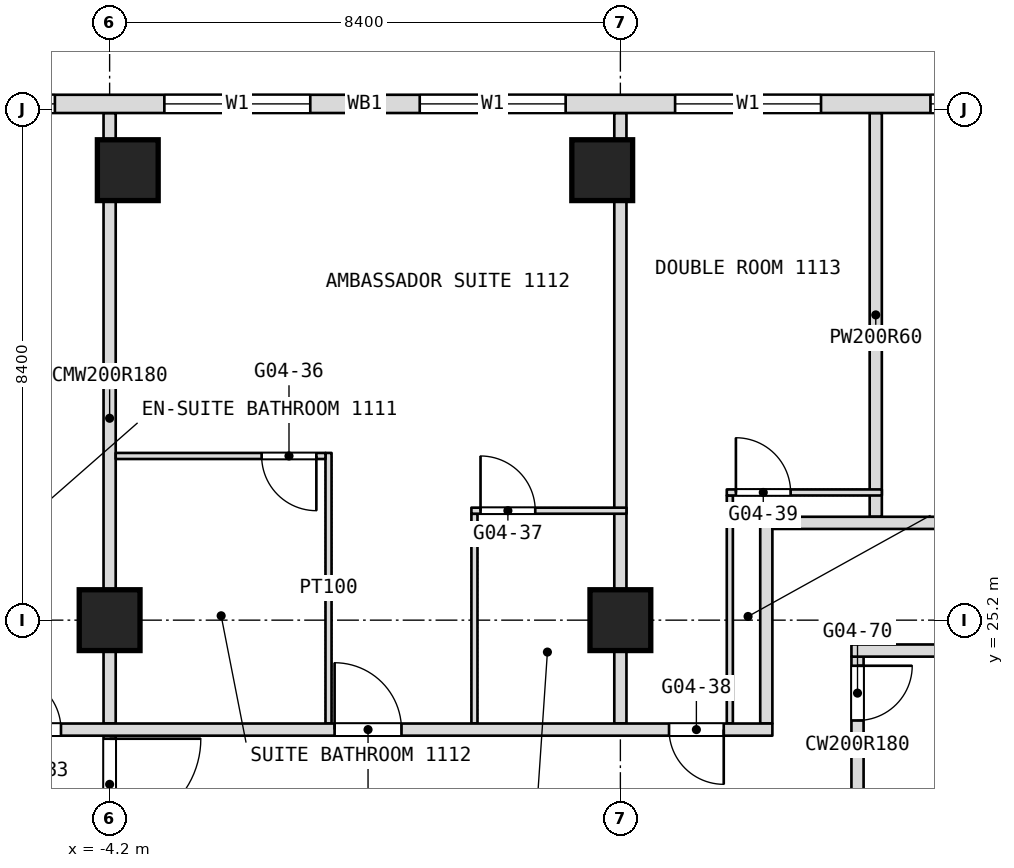
"""IFC4 building model, lengths in metres.
Left out: names, types, materials, properties, quantities, classifications, styles, units other than length and angle.
Written with IfcOpenShell. Run it as: python <this file> out.ifc"""

import sys

from ifc_helpers import new_model, si_unit, direction, frame, frame_2d, origin, origin_2d, place, context, subcontext, project, spatial, rectangle, extrude, element, fill, save


model = new_model("IFC4")
c1 = context("Model", 3, precision=1e-05, world=origin(), true_north=direction((0.0, 1.0)))
c2 = subcontext(c1, "Body", "Model", "MODEL_VIEW")
j1 = project(units=[si_unit("LENGTHUNIT", "METRE"), si_unit("PLANEANGLEUNIT", "RADIAN")], contexts=[c1])
p1 = place(None, origin())
s1 = spatial("IfcSite", under=j1, at=p1, CompositionType="ELEMENT")
p2 = place(p1, origin())
s2 = spatial("IfcBuilding", under=s1, at=p2, CompositionType="ELEMENT")
p3 = place(p2, frame((0.0, 0.0, 54.5)))
s3 = spatial("IfcBuildingStorey", under=s2, at=p3, CompositionType="ELEMENT", Elevation=54.5)
for number, where, z_axis, x_axis in (
    (1, (-4.2, 25.2, 0.0), (0.0, 0.0, 1.0), (1.0, 0.0, 0.0)),
    (2, (4.2, 25.2, 0.0), (0.0, 0.0, 1.0), (1.0, 0.0, 0.0)),
    (3, (-3.901, 32.6, 0.0), (0.0, 0.0, 1.0), (1.0, 0.0, 0.0)),
    (4, (3.901, 32.6, 0.0), (0.0, 0.0, 1.0), (1.0, 0.0, 0.0)),
):
    element("IfcColumn", number, at=place(p3, frame(where, z_axis=z_axis, x_axis=x_axis)), inside=s3, PredefinedType="COLUMN", context=c2, shape_type="SweptSolid", body=[
        extrude(rectangle(XDim=1.0, YDim=1.0, at=origin_2d()), origin(), (0.0, 0.0, 1.0), 3.6),
    ])
p4 = place(p3, frame((8.4, 26.9, 0.0), z_axis=(0.0, 0.0, 1.0), x_axis=(0.0, 1.0, 0.0)))
e5 = element("IfcWall", 5, at=p4, inside=s3, PredefinedType="PARTITIONING", context=c2, shape_type="SweptSolid", body=[
    extrude(rectangle(XDim=6.64, YDim=0.2, at=frame_2d((3.32, 0.0))), origin(), (0.0, 0.0, 1.0), 3.34),
])
p5 = place(p3, frame((8.1, 21.7, 0.0), z_axis=(0.0, 0.0, 1.0), x_axis=(0.0, 1.0, 0.0)))
e6 = element("IfcWall", 6, at=p5, inside=s3, PredefinedType="PARTITIONING", context=c2, shape_type="SweptSolid", body=[
    extrude(rectangle(XDim=2.9, YDim=0.2, at=frame_2d((1.45, 0.0))), origin(), (0.0, 0.0, 1.0), 3.34),
])
p6 = place(p5, frame((1.85, 0.0, 0.0)))
e7 = element("IfcOpeningElement", 7, at=p6, cuts=e6, PredefinedType="OPENING", context=c2, shape_type="SweptSolid", body=[
    extrude(rectangle(XDim=0.9, YDim=2.1, at=frame_2d((0.45, 1.05))), frame((0.0, 0.1, 0.0), z_axis=(0.0, -1.0, 0.0), x_axis=(1.0, 0.0, 0.0)), (0.0, 0.0, 1.0), 0.2),
])
p7 = place(p3, frame((6.6, 23.5, 0.0), z_axis=(0.0, 0.0, 1.0), x_axis=(0.0, 1.0, 0.0)))
e8 = element("IfcWall", 8, at=p7, inside=s3, PredefinedType="PARTITIONING", context=c2, shape_type="SweptSolid", body=[
    extrude(rectangle(XDim=3.4, YDim=0.2, at=frame_2d((1.7, 0.0))), origin(), (0.0, 0.0, 1.0), 3.34),
])
p8 = place(p3, frame((6.0, 23.5, 0.0), z_axis=(0.0, 0.0, 1.0), x_axis=(0.0, 1.0, 0.0)))
e9 = element("IfcWall", 9, at=p8, inside=s3, PredefinedType="PARTITIONING", context=c2, shape_type="SweptSolid", body=[
    extrude(rectangle(XDim=3.75, YDim=0.1, at=frame_2d((1.875, 0.0))), origin(), (0.0, 0.0, 1.0), 3.34),
])
p9 = place(p3, frame((4.2, 23.5, 0.0), z_axis=(0.0, 0.0, 1.0), x_axis=(0.0, 1.0, 0.0)))
e10 = element("IfcWall", 10, at=p9, inside=s3, PredefinedType="PARTITIONING", context=c2, shape_type="SweptSolid", body=[
    extrude(rectangle(XDim=10.04, YDim=0.2, at=frame_2d((5.02, 0.0))), origin(), (0.0, 0.0, 1.0), 3.34),
])
p10 = place(p3, frame((1.8, 23.5, 0.0), z_axis=(0.0, 0.0, 1.0), x_axis=(0.0, 1.0, 0.0)))
e11 = element("IfcWall", 11, at=p10, inside=s3, PredefinedType="PARTITIONING", context=c2, shape_type="SweptSolid", body=[
    extrude(rectangle(XDim=3.45, YDim=0.1, at=frame_2d((1.725, 0.0))), origin(), (0.0, 0.0, 1.0), 3.34),
])
p11 = place(p3, frame((-0.6, 23.5, 0.0), z_axis=(0.0, 0.0, 1.0), x_axis=(0.0, 1.0, 0.0)))
e12 = element("IfcWall", 12, at=p11, inside=s3, PredefinedType="PARTITIONING", context=c2, shape_type="SweptSolid", body=[
    extrude(rectangle(XDim=4.45, YDim=0.1, at=frame_2d((2.225, 0.0))), origin(), (0.0, 0.0, 1.0), 3.34),
])
p12 = place(p3, frame((-4.2, 16.8, 0.0), z_axis=(0.0, 0.0, 1.0), x_axis=(0.0, 1.0, 0.0)))
e13 = element("IfcWall", 13, at=p12, inside=s3, PredefinedType="PARTITIONING", context=c2, shape_type="SweptSolid", body=[
    extrude(rectangle(XDim=6.7, YDim=0.2, at=frame_2d((3.35, 0.0))), origin(), (0.0, 0.0, 1.0), 3.34),
])
p13 = place(p12, frame((0.15, 0.0, 0.0)))
e14 = element("IfcOpeningElement", 14, at=p13, cuts=e13, PredefinedType="OPENING", context=c2, shape_type="SweptSolid", body=[
    extrude(rectangle(XDim=1.5, YDim=2.1, at=frame_2d((0.75, 1.05))), frame((0.0, 0.1, 0.0), z_axis=(0.0, -1.0, 0.0), x_axis=(1.0, 0.0, 0.0)), (0.0, 0.0, 1.0), 0.2),
])
p14 = place(p12, frame((4.95, 0.0, 0.0)))
e15 = element("IfcOpeningElement", 15, at=p14, cuts=e13, PredefinedType="OPENING", context=c2, shape_type="SweptSolid", body=[
    extrude(rectangle(XDim=1.5, YDim=2.1, at=frame_2d((0.75, 1.05))), frame((0.0, 0.1, 0.0), z_axis=(0.0, -1.0, 0.0), x_axis=(1.0, 0.0, 0.0)), (0.0, 0.0, 1.0), 0.2),
])
p15 = place(p3, frame((-4.2, 23.5, 0.0), z_axis=(0.0, 0.0, 1.0), x_axis=(0.0, 1.0, 0.0)))
e16 = element("IfcWall", 16, at=p15, inside=s3, PredefinedType="PARTITIONING", context=c2, shape_type="SweptSolid", body=[
    extrude(rectangle(XDim=10.04, YDim=0.2, at=frame_2d((5.02, 0.0))), origin(), (0.0, 0.0, 1.0), 3.34),
])
p16 = place(p3, frame((-16.7, 23.4, 0.0), z_axis=(0.0, 0.0, 1.0), x_axis=(1.0, 0.0, 0.0)))
e17 = element("IfcWall", 17, at=p16, inside=s3, PredefinedType="PARTITIONING", context=c2, shape_type="SweptSolid", body=[
    extrude(rectangle(XDim=23.4, YDim=0.2, at=frame_2d((11.7, 0.0))), origin(), (0.0, 0.0, 1.0), 3.34),
])
p17 = place(p16, frame((2.4, 0.0, 0.0)))
e18 = element("IfcOpeningElement", 18, at=p17, cuts=e17, PredefinedType="OPENING", context=c2, shape_type="SweptSolid", body=[
    extrude(rectangle(XDim=0.9, YDim=2.1, at=frame_2d((0.45, 1.05))), frame((0.0, 0.1, 0.0), z_axis=(0.0, -1.0, 0.0), x_axis=(1.0, 0.0, 0.0)), (0.0, 0.0, 1.0), 0.2),
])
p18 = place(p16, frame((4.9, 0.0, 0.0)))
e19 = element("IfcOpeningElement", 19, at=p18, cuts=e17, PredefinedType="OPENING", context=c2, shape_type="SweptSolid", body=[
    extrude(rectangle(XDim=0.9, YDim=2.1, at=frame_2d((0.45, 1.05))), frame((0.0, 0.1, 0.0), z_axis=(0.0, -1.0, 0.0), x_axis=(1.0, 0.0, 0.0)), (0.0, 0.0, 1.0), 0.2),
])
p19 = place(p16, frame((10.8, 0.0, 0.0)))
e20 = element("IfcOpeningElement", 20, at=p19, cuts=e17, PredefinedType="OPENING", context=c2, shape_type="SweptSolid", body=[
    extrude(rectangle(XDim=0.9, YDim=2.1, at=frame_2d((0.45, 1.05))), frame((0.0, 0.1, 0.0), z_axis=(0.0, -1.0, 0.0), x_axis=(1.0, 0.0, 0.0)), (0.0, 0.0, 1.0), 0.2),
])
p20 = place(p16, frame((16.2, 0.0, 0.0)))
e21 = element("IfcOpeningElement", 21, at=p20, cuts=e17, PredefinedType="OPENING", context=c2, shape_type="SweptSolid", body=[
    extrude(rectangle(XDim=1.1, YDim=2.1, at=frame_2d((0.55, 1.05))), frame((0.0, 0.1, 0.0), z_axis=(0.0, -1.0, 0.0), x_axis=(1.0, 0.0, 0.0)), (0.0, 0.0, 1.0), 0.2),
])
p21 = place(p16, frame((21.7, 0.0, 0.0)))
e22 = element("IfcOpeningElement", 22, at=p21, cuts=e17, PredefinedType="OPENING", context=c2, shape_type="SweptSolid", body=[
    extrude(rectangle(XDim=0.9, YDim=2.1, at=frame_2d((0.45, 1.05))), frame((0.0, 0.1, 0.0), z_axis=(0.0, -1.0, 0.0), x_axis=(1.0, 0.0, 0.0)), (0.0, 0.0, 1.0), 0.2),
])
p22 = place(p3, frame((8.0, 24.7, 0.0), z_axis=(0.0, 0.0, 1.0), x_axis=(1.0, 0.0, 0.0)))
e23 = element("IfcWall", 23, at=p22, inside=s3, PredefinedType="PARTITIONING", context=c2, shape_type="SweptSolid", body=[
    extrude(rectangle(XDim=1.7, YDim=0.2, at=frame_2d((0.85, 0.0))), origin(), (0.0, 0.0, 1.0), 3.34),
])
p23 = place(p3, frame((6.7, 26.8, 0.0), z_axis=(0.0, 0.0, 1.0), x_axis=(1.0, 0.0, 0.0)))
e24 = element("IfcWall", 24, at=p23, inside=s3, PredefinedType="PARTITIONING", context=c2, shape_type="SweptSolid", body=[
    extrude(rectangle(XDim=8.0, YDim=0.2, at=frame_2d((4.0, 0.0))), origin(), (0.0, 0.0, 1.0), 3.34),
])
p24 = place(p3, frame((1.75, 27.0, 0.0), z_axis=(0.0, 0.0, 1.0), x_axis=(1.0, 0.0, 0.0)))
e25 = element("IfcWall", 25, at=p24, inside=s3, PredefinedType="PARTITIONING", context=c2, shape_type="SweptSolid", body=[
    extrude(rectangle(XDim=2.55, YDim=0.1, at=frame_2d((1.275, 0.0))), origin(), (0.0, 0.0, 1.0), 3.34),
])
p25 = place(p24, frame((0.15, 0.0, 0.0)))
e26 = element("IfcOpeningElement", 26, at=p25, cuts=e25, PredefinedType="OPENING", context=c2, shape_type="SweptSolid", body=[
    extrude(rectangle(XDim=0.9, YDim=2.1, at=frame_2d((0.45, 1.05))), frame((0.0, 0.05, 0.0), z_axis=(0.0, -1.0, 0.0), x_axis=(1.0, 0.0, 0.0)), (0.0, 0.0, 1.0), 0.1),
])
p26 = place(p3, frame((5.95, 27.3, 0.0), z_axis=(0.0, 0.0, 1.0), x_axis=(1.0, 0.0, 0.0)))
e27 = element("IfcWall", 27, at=p26, inside=s3, PredefinedType="PARTITIONING", context=c2, shape_type="SweptSolid", body=[
    extrude(rectangle(XDim=2.55, YDim=0.1, at=frame_2d((1.275, 0.0))), origin(), (0.0, 0.0, 1.0), 3.34),
])
p27 = place(p26, frame((0.15, 0.0, 0.0)))
e28 = element("IfcOpeningElement", 28, at=p27, cuts=e27, PredefinedType="OPENING", context=c2, shape_type="SweptSolid", body=[
    extrude(rectangle(XDim=0.9, YDim=2.1, at=frame_2d((0.45, 1.05))), frame((0.0, 0.05, 0.0), z_axis=(0.0, -1.0, 0.0), x_axis=(1.0, 0.0, 0.0)), (0.0, 0.0, 1.0), 0.1),
])
p28 = place(p3, frame((-4.1, 27.9, 0.0), z_axis=(0.0, 0.0, 1.0), x_axis=(1.0, 0.0, 0.0)))
e29 = element("IfcWall", 29, at=p28, inside=s3, PredefinedType="PARTITIONING", context=c2, shape_type="SweptSolid", body=[
    extrude(rectangle(XDim=3.45, YDim=0.1, at=frame_2d((1.725, 0.0))), origin(), (0.0, 0.0, 1.0), 3.34),
])
p29 = place(p28, frame((2.4, 0.0, 0.0)))
e30 = element("IfcOpeningElement", 30, at=p29, cuts=e29, PredefinedType="OPENING", context=c2, shape_type="SweptSolid", body=[
    extrude(rectangle(XDim=0.9, YDim=2.1, at=frame_2d((0.45, 1.05))), frame((0.0, 0.05, 0.0), z_axis=(0.0, -1.0, 0.0), x_axis=(1.0, 0.0, 0.0)), (0.0, 0.0, 1.0), 0.1),
])
p30 = place(p3, frame((23.406, 33.69, 0.0), z_axis=(0.0, 0.0, 1.0), x_axis=(-1.0, 0.0, 0.0)))
e31 = element("IfcWall", 31, at=p30, inside=s3, PredefinedType="NOTDEFINED", context=c2, shape_type="SweptSolid", body=[
    extrude(rectangle(XDim=46.812, YDim=0.3, at=frame_2d((23.406, 0.0))), origin(), (0.0, 0.0, 1.0), 3.6),
])
p31 = place(p30, frame((2.186, 0.0, 0.9)))
e32 = element("IfcOpeningElement", 32, at=p31, cuts=e31, PredefinedType="OPENING", context=c2, shape_type="SweptSolid", body=[
    extrude(rectangle(XDim=2.4, YDim=2.1, at=frame_2d((1.2, 1.05))), frame((0.0, 0.15, 0.0), z_axis=(0.0, -1.0, 0.0), x_axis=(1.0, 0.0, 0.0)), (0.0, 0.0, 1.0), 0.3),
])
p32 = place(p30, frame((7.506, 0.0, 0.9)))
e33 = element("IfcOpeningElement", 33, at=p32, cuts=e31, PredefinedType="OPENING", context=c2, shape_type="SweptSolid", body=[
    extrude(rectangle(XDim=2.4, YDim=2.1, at=frame_2d((1.2, 1.05))), frame((0.0, 0.15, 0.0), z_axis=(0.0, -1.0, 0.0), x_axis=(1.0, 0.0, 0.0)), (0.0, 0.0, 1.0), 0.3),
])
p33 = place(p30, frame((11.706, 0.0, 0.9)))
e34 = element("IfcOpeningElement", 34, at=p33, cuts=e31, PredefinedType="OPENING", context=c2, shape_type="SweptSolid", body=[
    extrude(rectangle(XDim=2.4, YDim=2.1, at=frame_2d((1.2, 1.05))), frame((0.0, 0.15, 0.0), z_axis=(0.0, -1.0, 0.0), x_axis=(1.0, 0.0, 0.0)), (0.0, 0.0, 1.0), 0.3),
])
p34 = place(p30, frame((15.906, 0.0, 0.9)))
e35 = element("IfcOpeningElement", 35, at=p34, cuts=e31, PredefinedType="OPENING", context=c2, shape_type="SweptSolid", body=[
    extrude(rectangle(XDim=2.4, YDim=2.1, at=frame_2d((1.2, 1.05))), frame((0.0, 0.15, 0.0), z_axis=(0.0, -1.0, 0.0), x_axis=(1.0, 0.0, 0.0)), (0.0, 0.0, 1.0), 0.3),
])
p35 = place(p30, frame((20.106, 0.0, 0.9)))
e36 = element("IfcOpeningElement", 36, at=p35, cuts=e31, PredefinedType="OPENING", context=c2, shape_type="SweptSolid", body=[
    extrude(rectangle(XDim=2.4, YDim=2.1, at=frame_2d((1.2, 1.05))), frame((0.0, 0.15, 0.0), z_axis=(0.0, -1.0, 0.0), x_axis=(1.0, 0.0, 0.0)), (0.0, 0.0, 1.0), 0.3),
])
p36 = place(p30, frame((24.306, 0.0, 0.9)))
e37 = element("IfcOpeningElement", 37, at=p36, cuts=e31, PredefinedType="OPENING", context=c2, shape_type="SweptSolid", body=[
    extrude(rectangle(XDim=2.4, YDim=2.1, at=frame_2d((1.2, 1.05))), frame((0.0, 0.15, 0.0), z_axis=(0.0, -1.0, 0.0), x_axis=(1.0, 0.0, 0.0)), (0.0, 0.0, 1.0), 0.3),
])
p37 = place(p30, frame((28.506, 0.0, 0.9)))
e38 = element("IfcOpeningElement", 38, at=p37, cuts=e31, PredefinedType="OPENING", context=c2, shape_type="SweptSolid", body=[
    extrude(rectangle(XDim=2.4, YDim=2.1, at=frame_2d((1.2, 1.05))), frame((0.0, 0.15, 0.0), z_axis=(0.0, -1.0, 0.0), x_axis=(1.0, 0.0, 0.0)), (0.0, 0.0, 1.0), 0.3),
])
p38 = place(p30, frame((32.706, 0.0, 0.9)))
e39 = element("IfcOpeningElement", 39, at=p38, cuts=e31, PredefinedType="OPENING", context=c2, shape_type="SweptSolid", body=[
    extrude(rectangle(XDim=2.4, YDim=2.1, at=frame_2d((1.2, 1.05))), frame((0.0, 0.15, 0.0), z_axis=(0.0, -1.0, 0.0), x_axis=(1.0, 0.0, 0.0)), (0.0, 0.0, 1.0), 0.3),
])
p39 = place(p30, frame((36.906, 0.0, 0.9)))
e40 = element("IfcOpeningElement", 40, at=p39, cuts=e31, PredefinedType="OPENING", context=c2, shape_type="SweptSolid", body=[
    extrude(rectangle(XDim=2.4, YDim=2.1, at=frame_2d((1.2, 1.05))), frame((0.0, 0.15, 0.0), z_axis=(0.0, -1.0, 0.0), x_axis=(1.0, 0.0, 0.0)), (0.0, 0.0, 1.0), 0.3),
])
p40 = place(p30, frame((42.226, 0.0, 0.9)))
e41 = element("IfcOpeningElement", 41, at=p40, cuts=e31, PredefinedType="OPENING", context=c2, shape_type="SweptSolid", body=[
    extrude(rectangle(XDim=2.4, YDim=2.1, at=frame_2d((1.2, 1.05))), frame((0.0, 0.15, 0.0), z_axis=(0.0, -1.0, 0.0), x_axis=(1.0, 0.0, 0.0)), (0.0, 0.0, 1.0), 0.3),
])
p41 = place(p6, origin())
e42 = element("IfcDoor", 42, at=p41, inside=s3, OperationType="SINGLE_SWING_LEFT", PredefinedType="DOOR", context=c2, shape_type="SweptSolid", body=[
    extrude(rectangle(XDim=0.9, YDim=2.1, at=frame_2d((0.45, 1.05))), frame((0.0, 0.025, 0.0), z_axis=(0.0, -1.0, 0.0), x_axis=(1.0, 0.0, 0.0)), (0.0, 0.0, 1.0), 0.05),
])
fill(e7, e42)
p42 = place(p19, origin())
e43 = element("IfcDoor", 43, at=p42, inside=s3, OperationType="SINGLE_SWING_LEFT", PredefinedType="DOOR", context=c2, shape_type="SweptSolid", body=[
    extrude(rectangle(XDim=0.9, YDim=2.1, at=frame_2d((0.45, 1.05))), frame((0.0, 0.025, 0.0), z_axis=(0.0, -1.0, 0.0), x_axis=(1.0, 0.0, 0.0)), (0.0, 0.0, 1.0), 0.05),
])
fill(e20, e43)
p43 = place(p20, origin())
e44 = element("IfcDoor", 44, at=p43, inside=s3, OperationType="SINGLE_SWING_LEFT", PredefinedType="DOOR", context=c2, shape_type="SweptSolid", body=[
    extrude(rectangle(XDim=1.1, YDim=2.1, at=frame_2d((0.55, 1.05))), frame((0.0, 0.025, 0.0), z_axis=(0.0, -1.0, 0.0), x_axis=(1.0, 0.0, 0.0)), (0.0, 0.0, 1.0), 0.05),
])
fill(e21, e44)
p44 = place(p21, origin())
e45 = element("IfcDoor", 45, at=p44, inside=s3, OperationType="SINGLE_SWING_RIGHT", PredefinedType="DOOR", context=c2, shape_type="SweptSolid", body=[
    extrude(rectangle(XDim=0.9, YDim=2.1, at=frame_2d((0.45, 1.05))), frame((0.0, 0.025, 0.0), z_axis=(0.0, -1.0, 0.0), x_axis=(1.0, 0.0, 0.0)), (0.0, 0.0, 1.0), 0.05),
])
fill(e22, e45)
p45 = place(p25, origin())
e46 = element("IfcDoor", 46, at=p45, inside=s3, OperationType="SINGLE_SWING_RIGHT", PredefinedType="DOOR", context=c2, shape_type="SweptSolid", body=[
    extrude(rectangle(XDim=0.9, YDim=2.1, at=frame_2d((0.45, 1.05))), frame((0.0, 0.025, 0.0), z_axis=(0.0, -1.0, 0.0), x_axis=(1.0, 0.0, 0.0)), (0.0, 0.0, 1.0), 0.05),
])
fill(e26, e46)
p46 = place(p27, origin())
e47 = element("IfcDoor", 47, at=p46, inside=s3, OperationType="SINGLE_SWING_RIGHT", PredefinedType="DOOR", context=c2, shape_type="SweptSolid", body=[
    extrude(rectangle(XDim=0.9, YDim=2.1, at=frame_2d((0.45, 1.05))), frame((0.0, 0.025, 0.0), z_axis=(0.0, -1.0, 0.0), x_axis=(1.0, 0.0, 0.0)), (0.0, 0.0, 1.0), 0.05),
])
fill(e28, e47)
p47 = place(p29, origin())
e48 = element("IfcDoor", 48, at=p47, inside=s3, OperationType="SINGLE_SWING_LEFT", PredefinedType="DOOR", context=c2, shape_type="SweptSolid", body=[
    extrude(rectangle(XDim=0.9, YDim=2.1, at=frame_2d((0.45, 1.05))), frame((0.0, 0.025, 0.0), z_axis=(0.0, -1.0, 0.0), x_axis=(1.0, 0.0, 0.0)), (0.0, 0.0, 1.0), 0.05),
])
fill(e30, e48)
p48 = place(p33, origin())
e49 = element("IfcWindow", 49, at=p48, inside=s3, PartitioningType="SINGLE_PANEL", PredefinedType="WINDOW", context=c2, shape_type="SweptSolid", body=[
    extrude(rectangle(XDim=2.4, YDim=2.1, at=frame_2d((1.2, 1.05))), frame((0.0, 0.03, 0.0), z_axis=(0.0, -1.0, 0.0), x_axis=(1.0, 0.0, 0.0)), (0.0, 0.0, 1.0), 0.06),
])
fill(e34, e49)
p49 = place(p34, origin())
e50 = element("IfcWindow", 50, at=p49, inside=s3, PartitioningType="SINGLE_PANEL", PredefinedType="WINDOW", context=c2, shape_type="SweptSolid", body=[
    extrude(rectangle(XDim=2.4, YDim=2.1, at=frame_2d((1.2, 1.05))), frame((0.0, 0.03, 0.0), z_axis=(0.0, -1.0, 0.0), x_axis=(1.0, 0.0, 0.0)), (0.0, 0.0, 1.0), 0.06),
])
fill(e35, e50)
p50 = place(p35, origin())
e51 = element("IfcWindow", 51, at=p50, inside=s3, PartitioningType="SINGLE_PANEL", PredefinedType="WINDOW", context=c2, shape_type="SweptSolid", body=[
    extrude(rectangle(XDim=2.4, YDim=2.1, at=frame_2d((1.2, 1.05))), frame((0.0, 0.03, 0.0), z_axis=(0.0, -1.0, 0.0), x_axis=(1.0, 0.0, 0.0)), (0.0, 0.0, 1.0), 0.06),
])
fill(e36, e51)
p51 = place(p36, origin())
e52 = element("IfcWindow", 52, at=p51, inside=s3, PartitioningType="SINGLE_PANEL", PredefinedType="WINDOW", context=c2, shape_type="SweptSolid", body=[
    extrude(rectangle(XDim=2.4, YDim=2.1, at=frame_2d((1.2, 1.05))), frame((0.0, 0.03, 0.0), z_axis=(0.0, -1.0, 0.0), x_axis=(1.0, 0.0, 0.0)), (0.0, 0.0, 1.0), 0.06),
])
fill(e37, e52)
p52 = place(p37, origin())
e53 = element("IfcWindow", 53, at=p52, inside=s3, PartitioningType="SINGLE_PANEL", PredefinedType="WINDOW", context=c2, shape_type="SweptSolid", body=[
    extrude(rectangle(XDim=2.4, YDim=2.1, at=frame_2d((1.2, 1.05))), frame((0.0, 0.03, 0.0), z_axis=(0.0, -1.0, 0.0), x_axis=(1.0, 0.0, 0.0)), (0.0, 0.0, 1.0), 0.06),
])
fill(e38, e53)
p53 = place(p14, origin())
e54 = element("IfcDoor", 54, at=p53, inside=s3, OperationType="DOUBLE_DOOR_DOUBLE_SWING", PredefinedType="DOOR", context=c2, shape_type="SweptSolid", body=[
    extrude(rectangle(XDim=1.5, YDim=2.1, at=frame_2d((0.75, 1.05))), frame((0.0, 0.025, 0.0), z_axis=(0.0, -1.0, 0.0), x_axis=(1.0, 0.0, 0.0)), (0.0, 0.0, 1.0), 0.05),
])
fill(e15, e54)
save(model, sys.argv[1])
